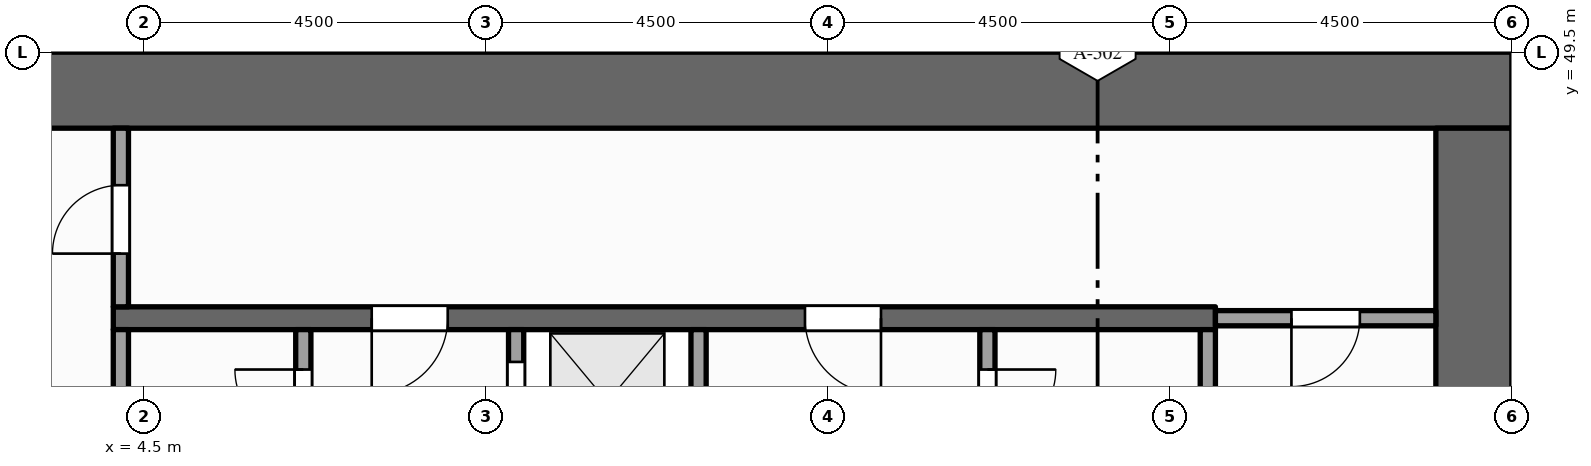
"""IFC4 building model, lengths in metres.
Left out: names, types, materials, properties, quantities, classifications, styles, units other than length and angle.
Written with IfcOpenShell. Run it as: python <this file> out.ifc"""

import sys

from ifc_helpers import new_model, si_unit, direction, frame, frame_2d, origin, place, context, subcontext, project, spatial, rectangle, extrude, element, fill, save


model = new_model("IFC4")
c1 = context("Model", 3, precision=1e-05, world=origin(), true_north=direction((0.0, 1.0)))
c2 = subcontext(c1, "Body", "Model", "MODEL_VIEW")
j1 = project(units=[si_unit("LENGTHUNIT", "METRE"), si_unit("PLANEANGLEUNIT", "RADIAN")], contexts=[c1])
p1 = place(None, origin())
s1 = spatial("IfcSite", under=j1, at=p1, CompositionType="ELEMENT")
p2 = place(p1, origin())
s2 = spatial("IfcBuilding", under=s1, at=p2, CompositionType="ELEMENT")
p3 = place(p2, frame((0.0, 0.0, 143.0)))
s3 = spatial("IfcBuildingStorey", under=s2, at=p3, CompositionType="ELEMENT", Elevation=143.0)
p4 = place(p3, frame((0.0, 49.0, -0.15), z_axis=(0.0, 0.0, 1.0), x_axis=(1.0, 0.0, 0.0)))
e1 = element("IfcWall", 1, at=p4, inside=s3, PredefinedType="SHEAR", context=c2, shape_type="SweptSolid", body=[
    extrude(rectangle(XDim=22.5, YDim=1.0, at=frame_2d((11.25, 0.0))), origin(), (0.0, 0.0, 1.0), 4.0),
])
p5 = place(p3, frame((22.0, 37.0, -0.15), z_axis=(0.0, 0.0, 1.0), x_axis=(0.0, 1.0, 0.0)))
e2 = element("IfcWall", 2, at=p5, inside=s3, PredefinedType="SHEAR", context=c2, shape_type="SweptSolid", body=[
    extrude(rectangle(XDim=11.5, YDim=1.0, at=frame_2d((5.75, 0.0))), origin(), (0.0, 0.0, 1.0), 4.0),
])
p6 = place(p3, frame((4.2, 43.525, 0.0), z_axis=(0.0, 0.0, 1.0), x_axis=(0.0, 1.0, 0.0)))
e3 = element("IfcWall", 3, at=p6, inside=s3, PredefinedType="PARTITIONING", context=c2, shape_type="SweptSolid", body=[
    extrude(rectangle(XDim=2.325, YDim=0.2, at=frame_2d((1.163, 0.0))), origin(), (0.0, 0.0, 1.0), 3.85),
])
p7 = place(p3, frame((4.2, 46.15, 0.0), z_axis=(0.0, 0.0, 1.0), x_axis=(0.0, 1.0, 0.0)))
e4 = element("IfcWall", 4, at=p7, inside=s3, PredefinedType="PARTITIONING", context=c2, shape_type="SweptSolid", body=[
    extrude(rectangle(XDim=2.35, YDim=0.2, at=frame_2d((1.175, 0.0))), origin(), (0.0, 0.0, 1.0), 3.85),
])
p8 = place(p7, frame((0.7, 0.0, 0.0)))
e5 = element("IfcOpeningElement", 5, at=p8, cuts=e4, PredefinedType="OPENING", context=c2, shape_type="SweptSolid", body=[
    extrude(rectangle(XDim=0.9, YDim=2.1, at=frame_2d((0.45, 1.05))), frame((0.0, 0.11, 0.0), z_axis=(0.0, -1.0, 0.0), x_axis=(1.0, 0.0, 0.0)), (0.0, 0.0, 1.0), 0.22),
])
p9 = place(p3, frame((6.6, 37.0, 0.0), z_axis=(0.0, 0.0, 1.0), x_axis=(0.0, 1.0, 0.0)))
e6 = element("IfcWall", 6, at=p9, inside=s3, PredefinedType="PARTITIONING", context=c2, shape_type="SweptSolid", body=[
    extrude(rectangle(XDim=8.85, YDim=0.2, at=frame_2d((4.425, 0.0))), origin(), (0.0, 0.0, 1.0), 3.85),
])
p10 = place(p9, frame((2.9, 0.0, 0.0)))
e7 = element("IfcOpeningElement", 7, at=p10, cuts=e6, PredefinedType="OPENING", context=c2, shape_type="SweptSolid", body=[
    extrude(rectangle(XDim=0.9, YDim=2.1, at=frame_2d((0.45, 1.05))), frame((0.0, 0.11, 0.0), z_axis=(0.0, -1.0, 0.0), x_axis=(1.0, 0.0, 0.0)), (0.0, 0.0, 1.0), 0.22),
])
p11 = place(p9, frame((7.425, 0.0, 0.0)))
e8 = element("IfcOpeningElement", 8, at=p11, cuts=e6, PredefinedType="OPENING", context=c2, shape_type="SweptSolid", body=[
    extrude(rectangle(XDim=0.9, YDim=2.1, at=frame_2d((0.45, 1.05))), frame((0.0, 0.11, 0.0), z_axis=(0.0, -1.0, 0.0), x_axis=(1.0, 0.0, 0.0)), (0.0, 0.0, 1.0), 0.22),
])
p12 = place(p3, frame((9.4, 37.0, 0.0), z_axis=(0.0, 0.0, 1.0), x_axis=(0.0, 1.0, 0.0)))
e9 = element("IfcWall", 9, at=p12, inside=s3, PredefinedType="SOLIDWALL", context=c2, shape_type="SweptSolid", body=[
    extrude(rectangle(XDim=8.85, YDim=0.2, at=frame_2d((4.425, 0.0))), origin(), (0.0, 0.0, 1.0), 3.85),
])
p13 = place(p12, frame((0.6, 0.0, 0.012)))
e10 = element("IfcOpeningElement", 10, at=p13, cuts=e9, PredefinedType="OPENING", context=c2, shape_type="SweptSolid", body=[
    extrude(rectangle(XDim=1.1, YDim=2.1, at=frame_2d((0.55, 1.05))), frame((0.0, 0.11, 0.0), z_axis=(0.0, -1.0, 0.0), x_axis=(1.0, 0.0, 0.0)), (0.0, 0.0, 1.0), 0.22),
])
p14 = place(p12, frame((2.95, 0.0, 0.012)))
e11 = element("IfcOpeningElement", 11, at=p14, cuts=e9, PredefinedType="OPENING", context=c2, shape_type="SweptSolid", body=[
    extrude(rectangle(XDim=1.1, YDim=2.1, at=frame_2d((0.55, 1.05))), frame((0.0, 0.11, 0.0), z_axis=(0.0, -1.0, 0.0), x_axis=(1.0, 0.0, 0.0)), (0.0, 0.0, 1.0), 0.22),
])
p15 = place(p12, frame((5.15, 0.0, 0.012)))
e12 = element("IfcOpeningElement", 12, at=p15, cuts=e9, PredefinedType="OPENING", context=c2, shape_type="SweptSolid", body=[
    extrude(rectangle(XDim=1.1, YDim=2.1, at=frame_2d((0.55, 1.05))), frame((0.0, 0.11, 0.0), z_axis=(0.0, -1.0, 0.0), x_axis=(1.0, 0.0, 0.0)), (0.0, 0.0, 1.0), 0.22),
])
p16 = place(p12, frame((7.325, 0.0, 0.012)))
e13 = element("IfcOpeningElement", 13, at=p16, cuts=e9, PredefinedType="OPENING", context=c2, shape_type="SweptSolid", body=[
    extrude(rectangle(XDim=1.1, YDim=2.1, at=frame_2d((0.55, 1.05))), frame((0.0, 0.11, 0.0), z_axis=(0.0, -1.0, 0.0), x_axis=(1.0, 0.0, 0.0)), (0.0, 0.0, 1.0), 0.22),
])
p17 = place(p3, frame((11.8, 37.0, 0.0), z_axis=(0.0, 0.0, 1.0), x_axis=(0.0, 1.0, 0.0)))
e14 = element("IfcWall", 14, at=p17, inside=s3, PredefinedType="SOLIDWALL", context=c2, shape_type="SweptSolid", body=[
    extrude(rectangle(XDim=8.85, YDim=0.2, at=frame_2d((4.425, 0.0))), origin(), (0.0, 0.0, 1.0), 3.85),
])
p18 = place(p3, frame((15.6, 43.9, 0.0), z_axis=(0.0, 0.0, 1.0), x_axis=(0.0, 1.0, 0.0)))
e15 = element("IfcWall", 15, at=p18, inside=s3, PredefinedType="PARTITIONING", context=c2, shape_type="SweptSolid", body=[
    extrude(rectangle(XDim=1.95, YDim=0.2, at=frame_2d((0.975, 0.0))), origin(), (0.0, 0.0, 1.0), 3.85),
])
p19 = place(p18, frame((0.525, 0.0, 0.0)))
e16 = element("IfcOpeningElement", 16, at=p19, cuts=e15, PredefinedType="OPENING", context=c2, shape_type="SweptSolid", body=[
    extrude(rectangle(XDim=0.9, YDim=2.1, at=frame_2d((0.45, 1.05))), frame((0.0, 0.11, 0.0), z_axis=(0.0, -1.0, 0.0), x_axis=(1.0, 0.0, 0.0)), (0.0, 0.0, 1.0), 0.22),
])
p20 = place(p3, frame((18.5, 43.9, 0.0), z_axis=(0.0, 0.0, 1.0), x_axis=(0.0, 1.0, 0.0)))
e17 = element("IfcWall", 17, at=p20, inside=s3, PredefinedType="PARTITIONING", context=c2, shape_type="SweptSolid", body=[
    extrude(rectangle(XDim=1.95, YDim=0.2, at=frame_2d((0.975, 0.0))), origin(), (0.0, 0.0, 1.0), 3.85),
])
p21 = place(p3, frame((4.1, 46.0, 0.0), z_axis=(0.0, 0.0, 1.0), x_axis=(1.0, 0.0, 0.0)))
e18 = element("IfcWall", 18, at=p21, inside=s3, PredefinedType="SHEAR", context=c2, shape_type="SweptSolid", body=[
    extrude(rectangle(XDim=14.5, YDim=0.3, at=frame_2d((7.25, 0.0))), origin(), (0.0, 0.0, 1.0), 3.85),
])
p22 = place(p21, frame((3.4, 0.0, 0.0)))
e19 = element("IfcOpeningElement", 19, at=p22, cuts=e18, PredefinedType="OPENING", context=c2, shape_type="SweptSolid", body=[
    extrude(rectangle(XDim=1.0, YDim=2.1, at=frame_2d((0.5, 1.05))), frame((0.0, 0.16, 0.0), z_axis=(0.0, -1.0, 0.0), x_axis=(1.0, 0.0, 0.0)), (0.0, 0.0, 1.0), 0.32),
])
p23 = place(p21, frame((9.1, 0.0, 0.0)))
e20 = element("IfcOpeningElement", 20, at=p23, cuts=e18, PredefinedType="OPENING", context=c2, shape_type="SweptSolid", body=[
    extrude(rectangle(XDim=1.0, YDim=2.1, at=frame_2d((0.5, 1.05))), frame((0.0, 0.16, 0.0), z_axis=(0.0, -1.0, 0.0), x_axis=(1.0, 0.0, 0.0)), (0.0, 0.0, 1.0), 0.32),
])
p24 = place(p3, frame((18.6, 46.0, 0.0), z_axis=(0.0, 0.0, 1.0), x_axis=(1.0, 0.0, 0.0)))
e21 = element("IfcWall", 21, at=p24, inside=s3, PredefinedType="PARTITIONING", context=c2, shape_type="SweptSolid", body=[
    extrude(rectangle(XDim=2.9, YDim=0.2, at=frame_2d((1.45, 0.0))), origin(), (0.0, 0.0, 1.0), 3.85),
])
p25 = place(p24, frame((1.0, 0.0, 0.0)))
e22 = element("IfcOpeningElement", 22, at=p25, cuts=e21, PredefinedType="OPENING", context=c2, shape_type="SweptSolid", body=[
    extrude(rectangle(XDim=0.9, YDim=2.1, at=frame_2d((0.45, 1.05))), frame((0.0, 0.11, 0.0), z_axis=(0.0, -1.0, 0.0), x_axis=(1.0, 0.0, 0.0)), (0.0, 0.0, 1.0), 0.22),
])
p26 = place(p16, origin())
e23 = element("IfcDoor", 23, at=p26, inside=s3, OperationType="SLIDING_TO_LEFT", PredefinedType="DOOR", context=c2, shape_type="SweptSolid", body=[
    extrude(rectangle(XDim=1.1, YDim=2.1, at=frame_2d((0.55, 1.05))), frame((0.0, 0.025, 0.0), z_axis=(0.0, -1.0, 0.0), x_axis=(1.0, 0.0, 0.0)), (0.0, 0.0, 1.0), 0.05),
])
fill(e13, e23)
p27 = place(p22, origin())
e24 = element("IfcDoor", 24, at=p27, inside=s3, OperationType="SINGLE_SWING_LEFT", PredefinedType="DOOR", context=c2, shape_type="SweptSolid", body=[
    extrude(rectangle(XDim=1.0, YDim=2.1, at=frame_2d((0.5, 1.05))), frame((0.0, 0.025, 0.0), z_axis=(0.0, -1.0, 0.0), x_axis=(1.0, 0.0, 0.0)), (0.0, 0.0, 1.0), 0.05),
])
fill(e19, e24)
p28 = place(p23, origin())
e25 = element("IfcDoor", 25, at=p28, inside=s3, OperationType="SINGLE_SWING_RIGHT", PredefinedType="DOOR", context=c2, shape_type="SweptSolid", body=[
    extrude(rectangle(XDim=1.0, YDim=2.1, at=frame_2d((0.5, 1.05))), frame((0.0, 0.025, 0.0), z_axis=(0.0, -1.0, 0.0), x_axis=(1.0, 0.0, 0.0)), (0.0, 0.0, 1.0), 0.05),
])
fill(e20, e25)
p29 = place(p8, origin())
e26 = element("IfcDoor", 26, at=p29, inside=s3, OperationType="SINGLE_SWING_LEFT", PredefinedType="DOOR", context=c2, shape_type="SweptSolid", body=[
    extrude(rectangle(XDim=0.9, YDim=2.1, at=frame_2d((0.45, 1.05))), frame((0.0, 0.025, 0.0), z_axis=(0.0, -1.0, 0.0), x_axis=(1.0, 0.0, 0.0)), (0.0, 0.0, 1.0), 0.05),
])
fill(e5, e26)
p30 = place(p25, origin())
e27 = element("IfcDoor", 27, at=p30, inside=s3, OperationType="SINGLE_SWING_LEFT", PredefinedType="DOOR", context=c2, shape_type="SweptSolid", body=[
    extrude(rectangle(XDim=0.9, YDim=2.1, at=frame_2d((0.45, 1.05))), frame((0.0, 0.025, 0.0), z_axis=(0.0, -1.0, 0.0), x_axis=(1.0, 0.0, 0.0)), (0.0, 0.0, 1.0), 0.05),
])
fill(e22, e27)
p31 = place(p11, origin())
e28 = element("IfcDoor", 28, at=p31, inside=s3, OperationType="SINGLE_SWING_RIGHT", PredefinedType="DOOR", context=c2, shape_type="SweptSolid", body=[
    extrude(rectangle(XDim=0.9, YDim=2.1, at=frame_2d((0.45, 1.05))), frame((0.0, 0.025, 0.0), z_axis=(0.0, -1.0, 0.0), x_axis=(1.0, 0.0, 0.0)), (0.0, 0.0, 1.0), 0.05),
])
fill(e8, e28)
p32 = place(p19, origin())
e29 = element("IfcDoor", 29, at=p32, inside=s3, OperationType="SINGLE_SWING_RIGHT", PredefinedType="DOOR", context=c2, shape_type="SweptSolid", body=[
    extrude(rectangle(XDim=0.9, YDim=2.1, at=frame_2d((0.45, 1.05))), frame((0.0, 0.025, 0.0), z_axis=(0.0, -1.0, 0.0), x_axis=(1.0, 0.0, 0.0)), (0.0, 0.0, 1.0), 0.05),
])
fill(e16, e29)
save(model, sys.argv[1])
